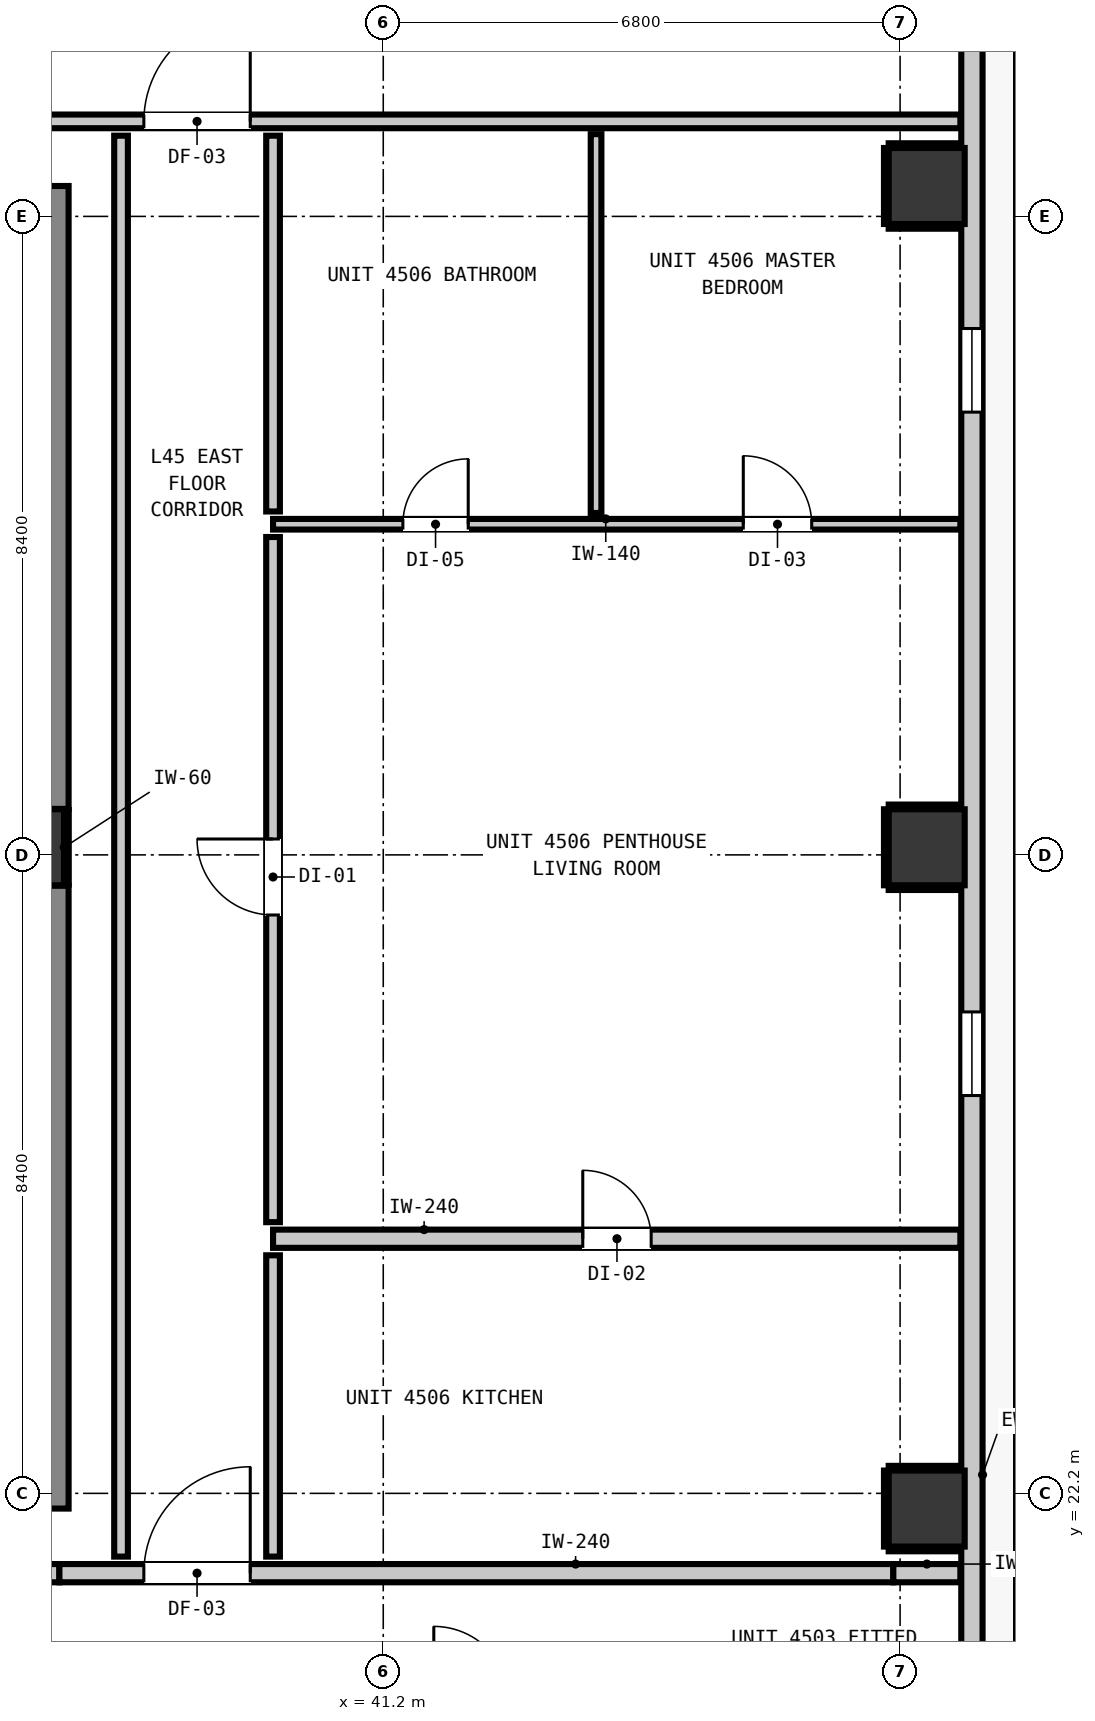
"""IFC4 building model, lengths in metres.
Left out: names, types, materials, properties, quantities, classifications, styles, units other than length and angle.
Written with IfcOpenShell. Run it as: python <this file> out.ifc"""

import sys

from ifc_helpers import new_model, si_unit, direction, frame, frame_2d, origin, origin_2d, place, context, subcontext, project, spatial, rectangle, extrude, element, fill, save


model = new_model("IFC4")
c1 = context("Model", 3, precision=1e-05, world=origin(), true_north=direction((0.0, 1.0)))
c2 = subcontext(c1, "Body", "Model", "MODEL_VIEW")
j1 = project(units=[si_unit("LENGTHUNIT", "METRE"), si_unit("PLANEANGLEUNIT", "RADIAN")], contexts=[c1])
p1 = place(None, origin())
s1 = spatial("IfcSite", under=j1, at=p1, CompositionType="ELEMENT")
p2 = place(p1, origin())
s2 = spatial("IfcBuilding", under=s1, at=p2, CompositionType="ELEMENT")
p3 = place(p2, frame((0.0, 0.0, 155.88)))
s3 = spatial("IfcBuildingStorey", under=s2, at=p3, CompositionType="ELEMENT", Elevation=155.88)
p4 = place(p3, frame((36.5, 30.7, 0.0), z_axis=(0.0, 0.0, 1.0), x_axis=(1.0, 0.0, 0.0)))
e1 = element("IfcColumn", 1, at=p4, inside=s3, PredefinedType="COLUMN", context=c2, shape_type="SweptSolid", body=[
    extrude(rectangle(XDim=1.0, YDim=1.0, at=origin_2d()), origin(), (0.0, 0.0, 1.0), 3.32),
])
p5 = place(p3, frame((36.56, 22.0, 0.0), z_axis=(0.0, 0.0, 1.0), x_axis=(0.0, 1.0, 0.0)))
e2 = element("IfcWall", 2, at=p5, inside=s3, PredefinedType="SHEAR", context=c2, shape_type="SweptSolid", body=[
    extrude(rectangle(XDim=8.195, YDim=1.0, at=frame_2d((4.098, 0.0))), origin(), (0.0, 0.0, 1.0), 3.32),
])
p6 = place(p3, frame((36.56, 31.205, 0.0), z_axis=(0.0, 0.0, 1.0), x_axis=(0.0, 1.0, 0.0)))
e3 = element("IfcWall", 3, at=p6, inside=s3, PredefinedType="SHEAR", context=c2, shape_type="SweptSolid", body=[
    extrude(rectangle(XDim=8.195, YDim=1.0, at=frame_2d((4.097, 0.0))), origin(), (0.0, 0.0, 1.0), 3.32),
])
for number, where, z_axis, x_axis in (
    (4, (48.35, 22.0, 0.0), (0.0, 0.0, 1.0), (1.0, 0.0, 0.0)),
    (5, (48.35, 30.7, 0.0), (0.0, 0.0, 1.0), (1.0, 0.0, 0.0)),
    (6, (48.35, 39.4, 0.0), (0.0, 0.0, 1.0), (1.0, 0.0, 0.0)),
):
    element("IfcColumn", number, at=place(p3, frame(where, z_axis=z_axis, x_axis=x_axis)), inside=s3, PredefinedType="COLUMN", context=c2, shape_type="SweptSolid", body=[
        extrude(rectangle(XDim=1.0, YDim=1.0, at=origin_2d()), origin(), (0.0, 0.0, 1.0), 3.32),
    ])
p7 = place(p3, frame((48.945, 49.845, 0.0), z_axis=(0.0, 0.0, 1.0), x_axis=(0.0, -1.0, 0.0)))
e7 = element("IfcWall", 7, at=p7, inside=s3, PredefinedType="STANDARD", context=c2, shape_type="SweptSolid", body=[
    extrude(rectangle(XDim=32.29, YDim=0.28, at=frame_2d((16.145, 0.0))), origin(), (0.0, 0.0, 1.0), 3.08),
])
p8 = place(p7, frame((0.904, 0.0, 0.0)))
e8 = element("IfcOpeningElement", 8, at=p8, cuts=e7, PredefinedType="OPENING", context=c2, shape_type="SweptSolid", body=[
    extrude(rectangle(XDim=1.0, YDim=2.15, at=frame_2d((0.5, 1.075))), frame((0.0, 0.15, 0.0), z_axis=(0.0, -1.0, 0.0), x_axis=(1.0, 0.0, 0.0)), (0.0, 0.0, 1.0), 0.3),
])
p9 = place(p7, frame((3.049, 0.0, 0.85)))
e9 = element("IfcOpeningElement", 9, at=p9, cuts=e7, PredefinedType="OPENING", context=c2, shape_type="SweptSolid", body=[
    extrude(rectangle(XDim=1.1, YDim=2.05, at=frame_2d((0.55, 1.025))), frame((0.0, 0.15, 0.0), z_axis=(0.0, -1.0, 0.0), x_axis=(1.0, 0.0, 0.0)), (0.0, 0.0, 1.0), 0.3),
])
p10 = place(p7, frame((21.311, 0.0, 0.85)))
e10 = element("IfcOpeningElement", 10, at=p10, cuts=e7, PredefinedType="OPENING", context=c2, shape_type="SweptSolid", body=[
    extrude(rectangle(XDim=1.1, YDim=2.05, at=frame_2d((0.55, 1.025))), frame((0.0, 0.15, 0.0), z_axis=(0.0, -1.0, 0.0), x_axis=(1.0, 0.0, 0.0)), (0.0, 0.0, 1.0), 0.3),
])
p11 = place(p7, frame((12.32, 0.0, 0.85)))
e11 = element("IfcOpeningElement", 11, at=p11, cuts=e7, PredefinedType="OPENING", context=c2, shape_type="SweptSolid", body=[
    extrude(rectangle(XDim=1.1, YDim=2.05, at=frame_2d((0.55, 1.025))), frame((0.0, 0.15, 0.0), z_axis=(0.0, -1.0, 0.0), x_axis=(1.0, 0.0, 0.0)), (0.0, 0.0, 1.0), 0.3),
])
p12 = place(p3, frame((9.407, 21.15, 0.0), z_axis=(0.0, 0.0, 1.0), x_axis=(1.0, 0.0, 0.0)))
e12 = element("IfcWall", 12, at=p12, inside=s3, PredefinedType="PARTITIONING", context=c2, shape_type="SweptSolid", body=[
    extrude(rectangle(XDim=27.532, YDim=0.24, at=frame_2d((13.766, 0.0))), origin(), (0.0, 0.0, 1.0), 3.08),
])
p13 = place(p12, frame((8.803, 0.0, 0.0)))
e13 = element("IfcOpeningElement", 13, at=p13, cuts=e12, PredefinedType="OPENING", context=c2, shape_type="SweptSolid", body=[
    extrude(rectangle(XDim=1.1, YDim=2.15, at=frame_2d((0.55, 1.075))), frame((0.0, 0.13, 0.0), z_axis=(0.0, -1.0, 0.0), x_axis=(1.0, 0.0, 0.0)), (0.0, 0.0, 1.0), 0.26),
])
p14 = place(p12, frame((1.192, 0.0, 0.0)))
e14 = element("IfcOpeningElement", 14, at=p14, cuts=e12, PredefinedType="OPENING", context=c2, shape_type="SweptSolid", body=[
    extrude(rectangle(XDim=1.4, YDim=2.15, at=frame_2d((0.7, 1.075))), frame((0.0, 0.13, 0.0), z_axis=(0.0, -1.0, 0.0), x_axis=(1.0, 0.0, 0.0)), (0.0, 0.0, 1.0), 0.26),
])
p15 = place(p3, frame((36.939, 21.15, 0.0), z_axis=(0.0, 0.0, 1.0), x_axis=(1.0, 0.0, 0.0)))
e15 = element("IfcWall", 15, at=p15, inside=s3, PredefinedType="PARTITIONING", context=c2, shape_type="SweptSolid", body=[
    extrude(rectangle(XDim=10.972, YDim=0.24, at=frame_2d((5.486, 0.0))), origin(), (0.0, 0.0, 1.0), 2.565),
])
p16 = place(p15, frame((1.111, 0.0, 0.0)))
e16 = element("IfcOpeningElement", 16, at=p16, cuts=e15, PredefinedType="OPENING", context=c2, shape_type="SweptSolid", body=[
    extrude(rectangle(XDim=1.4, YDim=2.15, at=frame_2d((0.7, 1.075))), frame((0.0, 0.13, 0.0), z_axis=(0.0, -1.0, 0.0), x_axis=(1.0, 0.0, 0.0)), (0.0, 0.0, 1.0), 0.26),
])
p17 = place(p3, frame((47.911, 21.15, 0.0), z_axis=(0.0, 0.0, 1.0), x_axis=(1.0, 0.0, 0.0)))
e17 = element("IfcWall", 17, at=p17, inside=s3, PredefinedType="PARTITIONING", context=c2, shape_type="SweptSolid", body=[
    extrude(rectangle(XDim=0.882, YDim=0.24, at=frame_2d((0.441, 0.0))), origin(), (0.0, 0.0, 1.0), 3.08),
])
p18 = place(p3, frame((39.75, 25.55, 0.0), z_axis=(0.0, 0.0, 1.0), x_axis=(1.0, 0.0, 0.0)))
e18 = element("IfcWall", 18, at=p18, inside=s3, PredefinedType="PARTITIONING", context=c2, shape_type="SweptSolid", body=[
    extrude(rectangle(XDim=9.043, YDim=0.24, at=frame_2d((4.521, 0.0))), origin(), (0.0, 0.0, 1.0), 3.08),
])
p19 = place(p18, frame((4.075, 0.0, 0.0)))
e19 = element("IfcOpeningElement", 19, at=p19, cuts=e18, PredefinedType="OPENING", context=c2, shape_type="SweptSolid", body=[
    extrude(rectangle(XDim=0.9, YDim=2.1, at=frame_2d((0.45, 1.05))), frame((0.0, 0.13, 0.0), z_axis=(0.0, -1.0, 0.0), x_axis=(1.0, 0.0, 0.0)), (0.0, 0.0, 1.0), 0.26),
])
p20 = place(p3, frame((9.407, 40.25, 0.0), z_axis=(0.0, 0.0, 1.0), x_axis=(1.0, 0.0, 0.0)))
e20 = element("IfcWall", 20, at=p20, inside=s3, PredefinedType="PARTITIONING", context=c2, shape_type="SweptSolid", body=[
    extrude(rectangle(XDim=39.386, YDim=0.18, at=frame_2d((19.693, 0.0))), origin(), (0.0, 0.0, 1.0), 3.08),
])
p21 = place(p20, frame((8.028, 0.0, 0.0)))
e21 = element("IfcOpeningElement", 21, at=p21, cuts=e20, PredefinedType="OPENING", context=c2, shape_type="SweptSolid", body=[
    extrude(rectangle(XDim=1.4, YDim=2.15, at=frame_2d((0.7, 1.075))), frame((0.0, 0.1, 0.0), z_axis=(0.0, -1.0, 0.0), x_axis=(1.0, 0.0, 0.0)), (0.0, 0.0, 1.0), 0.2),
])
p22 = place(p20, frame((1.192, 0.0, 0.0)))
e22 = element("IfcOpeningElement", 22, at=p22, cuts=e20, PredefinedType="OPENING", context=c2, shape_type="SweptSolid", body=[
    extrude(rectangle(XDim=1.4, YDim=2.15, at=frame_2d((0.7, 1.075))), frame((0.0, 0.1, 0.0), z_axis=(0.0, -1.0, 0.0), x_axis=(1.0, 0.0, 0.0)), (0.0, 0.0, 1.0), 0.2),
])
p23 = place(p20, frame((28.643, 0.0, 0.0)))
e23 = element("IfcOpeningElement", 23, at=p23, cuts=e20, PredefinedType="OPENING", context=c2, shape_type="SweptSolid", body=[
    extrude(rectangle(XDim=1.4, YDim=2.15, at=frame_2d((0.7, 1.075))), frame((0.0, 0.1, 0.0), z_axis=(0.0, -1.0, 0.0), x_axis=(1.0, 0.0, 0.0)), (0.0, 0.0, 1.0), 0.2),
])
p24 = place(p3, frame((39.75, 34.95, 0.0), z_axis=(0.0, 0.0, 1.0), x_axis=(1.0, 0.0, 0.0)))
e24 = element("IfcWall", 24, at=p24, inside=s3, PredefinedType="PARTITIONING", context=c2, shape_type="SweptSolid", body=[
    extrude(rectangle(XDim=9.043, YDim=0.14, at=frame_2d((4.521, 0.0))), origin(), (0.0, 0.0, 1.0), 3.08),
])
p25 = place(p24, frame((1.708, 0.0, 0.0)))
e25 = element("IfcOpeningElement", 25, at=p25, cuts=e24, PredefinedType="OPENING", context=c2, shape_type="SweptSolid", body=[
    extrude(rectangle(XDim=0.86, YDim=2.02, at=frame_2d((0.43, 1.01))), frame((0.0, 0.08, 0.0), z_axis=(0.0, -1.0, 0.0), x_axis=(1.0, 0.0, 0.0)), (0.0, 0.0, 1.0), 0.16),
])
p26 = place(p24, frame((6.187, 0.0, 0.0)))
e26 = element("IfcOpeningElement", 26, at=p26, cuts=e24, PredefinedType="OPENING", context=c2, shape_type="SweptSolid", body=[
    extrude(rectangle(XDim=0.9, YDim=2.1, at=frame_2d((0.45, 1.05))), frame((0.0, 0.08, 0.0), z_axis=(0.0, -1.0, 0.0), x_axis=(1.0, 0.0, 0.0)), (0.0, 0.0, 1.0), 0.16),
])
p27 = place(p3, frame((37.75, 21.368, 0.0), z_axis=(0.0, 0.0, 1.0), x_axis=(0.0, 1.0, 0.0)))
e27 = element("IfcWall", 27, at=p27, inside=s3, PredefinedType="PARTITIONING", context=c2, shape_type="SweptSolid", body=[
    extrude(rectangle(XDim=18.694, YDim=0.18, at=frame_2d((9.347, 0.0))), origin(), (0.0, 0.0, 1.0), 3.08),
])
p28 = place(p3, frame((39.75, 21.368, 0.0), z_axis=(0.0, 0.0, 1.0), x_axis=(0.0, 1.0, 0.0)))
e28 = element("IfcWall", 28, at=p28, inside=s3, PredefinedType="PARTITIONING", context=c2, shape_type="SweptSolid", body=[
    extrude(rectangle(XDim=3.964, YDim=0.18, at=frame_2d((1.982, 0.0))), origin(), (0.0, 0.0, 1.0), 3.08),
])
p29 = place(p3, frame((39.75, 25.768, 0.0), z_axis=(0.0, 0.0, 1.0), x_axis=(0.0, 1.0, 0.0)))
e29 = element("IfcWall", 29, at=p29, inside=s3, PredefinedType="PARTITIONING", context=c2, shape_type="SweptSolid", body=[
    extrude(rectangle(XDim=9.014, YDim=0.18, at=frame_2d((4.507, 0.0))), origin(), (0.0, 0.0, 1.0), 3.08),
])
p30 = place(p29, frame((4.041, 0.0, 0.0)))
e30 = element("IfcOpeningElement", 30, at=p30, cuts=e29, PredefinedType="OPENING", context=c2, shape_type="SweptSolid", body=[
    extrude(rectangle(XDim=1.0, YDim=2.15, at=frame_2d((0.5, 1.075))), frame((0.0, 0.1, 0.0), z_axis=(0.0, -1.0, 0.0), x_axis=(1.0, 0.0, 0.0)), (0.0, 0.0, 1.0), 0.2),
])
p31 = place(p3, frame((39.75, 35.118, 0.0), z_axis=(0.0, 0.0, 1.0), x_axis=(0.0, 1.0, 0.0)))
e31 = element("IfcWall", 31, at=p31, inside=s3, PredefinedType="PARTITIONING", context=c2, shape_type="SweptSolid", body=[
    extrude(rectangle(XDim=4.944, YDim=0.18, at=frame_2d((2.472, 0.0))), origin(), (0.0, 0.0, 1.0), 3.08),
])
p32 = place(p3, frame((44.0, 35.098, 0.0), z_axis=(0.0, 0.0, 1.0), x_axis=(0.0, 1.0, 0.0)))
e32 = element("IfcWall", 32, at=p32, inside=s3, PredefinedType="PARTITIONING", context=c2, shape_type="SweptSolid", body=[
    extrude(rectangle(XDim=4.984, YDim=0.14, at=frame_2d((2.492, 0.0))), origin(), (0.0, 0.0, 1.0), 3.08),
])
p33 = place(p3, frame((37.032, 30.21, 0.0), z_axis=(0.0, 0.0, 1.0), x_axis=(0.0, 1.0, 0.0)))
e33 = element("IfcWall", 33, at=p33, inside=s3, PredefinedType="PARTITIONING", context=c2, shape_type="SweptSolid", body=[
    extrude(rectangle(XDim=0.98, YDim=0.06, at=frame_2d((0.49, 0.0))), origin(), (0.0, 0.0, 1.0), 1.45),
])
for number, where, z_axis, x_axis in (
    (34, (47.85, 21.468, 0.0), (0.0, 0.0, 1.0), (1.0, 0.0, 0.0)),
    (35, (47.85, 22.532, 0.0), (0.0, 0.0, 1.0), (1.0, 0.0, 0.0)),
):
    element("IfcWall", number, at=place(p3, frame(where, z_axis=z_axis, x_axis=x_axis)), inside=s3, PredefinedType="PARTITIONING", context=c2, shape_type="SweptSolid", body=[
        extrude(rectangle(XDim=0.94, YDim=0.06, at=frame_2d((0.47, 0.0))), origin(), (0.0, 0.0, 1.0), 1.45),
    ])
p34 = place(p3, frame((47.818, 21.5, 0.0), z_axis=(0.0, 0.0, 1.0), x_axis=(0.0, 1.0, 0.0)))
e36 = element("IfcWall", 36, at=p34, inside=s3, PredefinedType="PARTITIONING", context=c2, shape_type="SweptSolid", body=[
    extrude(rectangle(XDim=1.0, YDim=0.06, at=frame_2d((0.5, 0.0))), origin(), (0.0, 0.0, 1.0), 1.45),
])
for number, where, z_axis, x_axis in (
    (37, (47.85, 30.168, 0.0), (0.0, 0.0, 1.0), (1.0, 0.0, 0.0)),
    (38, (47.85, 31.232, 0.0), (0.0, 0.0, 1.0), (1.0, 0.0, 0.0)),
):
    element("IfcWall", number, at=place(p3, frame(where, z_axis=z_axis, x_axis=x_axis)), inside=s3, PredefinedType="PARTITIONING", context=c2, shape_type="SweptSolid", body=[
        extrude(rectangle(XDim=0.94, YDim=0.06, at=frame_2d((0.47, 0.0))), origin(), (0.0, 0.0, 1.0), 1.45),
    ])
p35 = place(p3, frame((47.818, 30.2, 0.0), z_axis=(0.0, 0.0, 1.0), x_axis=(0.0, 1.0, 0.0)))
e39 = element("IfcWall", 39, at=p35, inside=s3, PredefinedType="PARTITIONING", context=c2, shape_type="SweptSolid", body=[
    extrude(rectangle(XDim=1.0, YDim=0.06, at=frame_2d((0.5, 0.0))), origin(), (0.0, 0.0, 1.0), 1.45),
])
for number, where, z_axis, x_axis in (
    (40, (47.85, 38.868, 0.0), (0.0, 0.0, 1.0), (1.0, 0.0, 0.0)),
    (41, (47.85, 39.932, 0.0), (0.0, 0.0, 1.0), (1.0, 0.0, 0.0)),
):
    element("IfcWall", number, at=place(p3, frame(where, z_axis=z_axis, x_axis=x_axis)), inside=s3, PredefinedType="PARTITIONING", context=c2, shape_type="SweptSolid", body=[
        extrude(rectangle(XDim=0.94, YDim=0.06, at=frame_2d((0.47, 0.0))), origin(), (0.0, 0.0, 1.0), 1.45),
    ])
p36 = place(p3, frame((47.818, 38.9, 0.0), z_axis=(0.0, 0.0, 1.0), x_axis=(0.0, 1.0, 0.0)))
e42 = element("IfcWall", 42, at=p36, inside=s3, PredefinedType="PARTITIONING", context=c2, shape_type="SweptSolid", body=[
    extrude(rectangle(XDim=1.0, YDim=0.06, at=frame_2d((0.5, 0.0))), origin(), (0.0, 0.0, 1.0), 1.45),
])
p37 = place(p10, origin())
e43 = element("IfcWindow", 43, at=p37, inside=s3, PartitioningType="SINGLE_PANEL", PredefinedType="WINDOW", context=c2, shape_type="SweptSolid", body=[
    extrude(rectangle(XDim=1.1, YDim=2.05, at=frame_2d((0.55, 1.025))), frame((0.0, 0.03, 0.0), z_axis=(0.0, -1.0, 0.0), x_axis=(1.0, 0.0, 0.0)), (0.0, 0.0, 1.0), 0.06),
])
fill(e10, e43)
p38 = place(p11, origin())
e44 = element("IfcWindow", 44, at=p38, inside=s3, PartitioningType="SINGLE_PANEL", PredefinedType="WINDOW", context=c2, shape_type="SweptSolid", body=[
    extrude(rectangle(XDim=1.1, YDim=2.05, at=frame_2d((0.55, 1.025))), frame((0.0, 0.03, 0.0), z_axis=(0.0, -1.0, 0.0), x_axis=(1.0, 0.0, 0.0)), (0.0, 0.0, 1.0), 0.06),
])
fill(e11, e44)
p39 = place(p16, origin())
e45 = element("IfcDoor", 45, at=p39, inside=s3, OperationType="SINGLE_SWING_RIGHT", PredefinedType="DOOR", context=c2, shape_type="SweptSolid", body=[
    extrude(rectangle(XDim=1.4, YDim=2.15, at=frame_2d((0.7, 1.075))), frame((0.0, 0.025, 0.0), z_axis=(0.0, -1.0, 0.0), x_axis=(1.0, 0.0, 0.0)), (0.0, 0.0, 1.0), 0.05),
])
fill(e16, e45)
p40 = place(p23, origin())
e46 = element("IfcDoor", 46, at=p40, inside=s3, OperationType="SINGLE_SWING_RIGHT", PredefinedType="DOOR", context=c2, shape_type="SweptSolid", body=[
    extrude(rectangle(XDim=1.4, YDim=2.15, at=frame_2d((0.7, 1.075))), frame((0.0, 0.025, 0.0), z_axis=(0.0, -1.0, 0.0), x_axis=(1.0, 0.0, 0.0)), (0.0, 0.0, 1.0), 0.05),
])
fill(e23, e46)
p41 = place(p30, origin())
e47 = element("IfcDoor", 47, at=p41, inside=s3, OperationType="SINGLE_SWING_RIGHT", PredefinedType="DOOR", context=c2, shape_type="SweptSolid", body=[
    extrude(rectangle(XDim=1.0, YDim=2.15, at=frame_2d((0.5, 1.075))), frame((0.0, 0.025, 0.0), z_axis=(0.0, -1.0, 0.0), x_axis=(1.0, 0.0, 0.0)), (0.0, 0.0, 1.0), 0.05),
])
fill(e30, e47)
p42 = place(p19, origin())
e48 = element("IfcDoor", 48, at=p42, inside=s3, OperationType="SINGLE_SWING_LEFT", PredefinedType="DOOR", context=c2, shape_type="SweptSolid", body=[
    extrude(rectangle(XDim=0.9, YDim=2.1, at=frame_2d((0.45, 1.05))), frame((0.0, 0.025, 0.0), z_axis=(0.0, -1.0, 0.0), x_axis=(1.0, 0.0, 0.0)), (0.0, 0.0, 1.0), 0.05),
])
fill(e19, e48)
p43 = place(p25, origin())
e49 = element("IfcDoor", 49, at=p43, inside=s3, OperationType="SINGLE_SWING_RIGHT", PredefinedType="DOOR", context=c2, shape_type="SweptSolid", body=[
    extrude(rectangle(XDim=0.86, YDim=2.02, at=frame_2d((0.43, 1.01))), frame((0.0, 0.025, 0.0), z_axis=(0.0, -1.0, 0.0), x_axis=(1.0, 0.0, 0.0)), (0.0, 0.0, 1.0), 0.05),
])
fill(e25, e49)
p44 = place(p26, origin())
e50 = element("IfcDoor", 50, at=p44, inside=s3, OperationType="SINGLE_SWING_LEFT", PredefinedType="DOOR", context=c2, shape_type="SweptSolid", body=[
    extrude(rectangle(XDim=0.9, YDim=2.1, at=frame_2d((0.45, 1.05))), frame((0.0, 0.025, 0.0), z_axis=(0.0, -1.0, 0.0), x_axis=(1.0, 0.0, 0.0)), (0.0, 0.0, 1.0), 0.05),
])
fill(e26, e50)
save(model, sys.argv[1])
